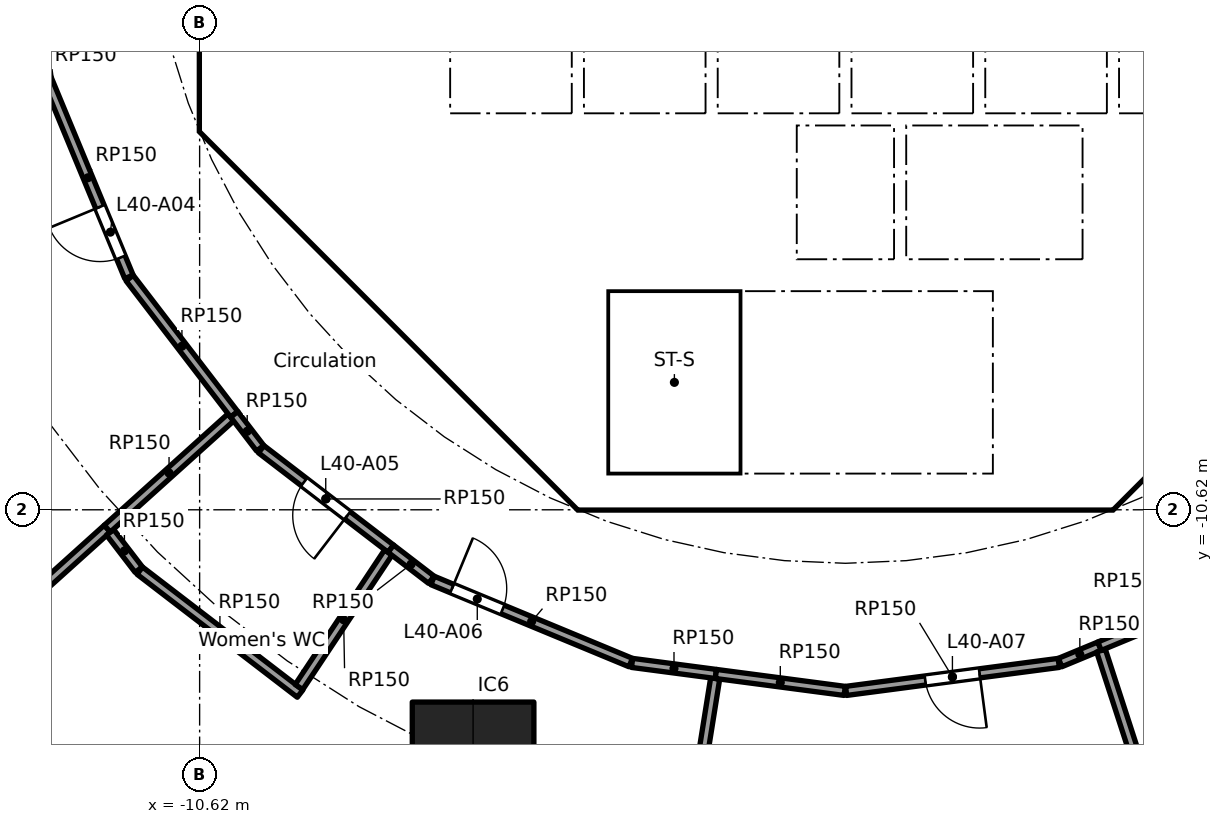
"""IFC4 building model, lengths in metres.
Left out: names, types, materials, properties, quantities, classifications, styles, units other than length and angle.
Written with IfcOpenShell. Run it as: python <this file> out.ifc"""

import sys

from ifc_helpers import new_model, si_unit, direction, frame, frame_2d, origin, origin_2d, place, context, subcontext, project, spatial, polyline, rectangle, outline, extrude, element, fill, save


model = new_model("IFC4")
c1 = context("Model", 3, precision=1e-05, world=origin(), true_north=direction((0.0, 1.0)))
c2 = subcontext(c1, "Body", "Model", "MODEL_VIEW")
j1 = project(units=[si_unit("LENGTHUNIT", "METRE"), si_unit("PLANEANGLEUNIT", "RADIAN")], contexts=[c1])
p1 = place(None, origin())
s1 = spatial("IfcSite", under=j1, at=p1, CompositionType="ELEMENT")
p2 = place(p1, origin())
s2 = spatial("IfcBuilding", under=s1, at=p2, CompositionType="ELEMENT")
p3 = place(p2, frame((0.0, 0.0, 160.3)))
s3 = spatial("IfcBuildingStorey", under=s2, at=p3, CompositionType="ELEMENT", Elevation=160.3)
p4 = place(p3, frame((-6.123, -14.782, 0.0), z_axis=(0.0, 0.0, 1.0), x_axis=(1.0, 0.0, 0.0)))
e1 = element("IfcColumn", 1, at=p4, inside=s3, PredefinedType="COLUMN", context=c2, shape_type="SweptSolid", body=[
    extrude(rectangle(XDim=2.0, YDim=2.0, at=origin_2d()), origin(), (0.0, 0.0, 1.0), 5.6),
])
p5 = place(p3, frame((-10.325, 3.801, 0.0), z_axis=(0.0, 0.0, 1.0), x_axis=(0.0, -1.0, 0.0)))
e2 = element("IfcWall", 2, at=p5, inside=s3, PredefinedType="SHEAR", context=c2, shape_type="SweptSolid", body=[
    extrude(rectangle(XDim=7.602, YDim=0.6, at=frame_2d((3.801, 0.0))), origin(), (0.0, 0.0, 1.0), 5.34),
])
p6 = place(p5, frame((0.651, 0.0, 0.0)))
e3 = element("IfcOpeningElement", 3, at=p6, cuts=e2, PredefinedType="OPENING", context=c2, shape_type="SweptSolid", body=[
    extrude(rectangle(XDim=1.5, YDim=2.1, at=frame_2d((0.75, 1.05))), frame((0.0, 0.31, 0.0), z_axis=(0.0, -1.0, 0.0), x_axis=(1.0, 0.0, 0.0)), (0.0, 0.0, 1.0), 0.62),
])
p7 = place(p5, frame((5.451, 0.0, 0.0)))
e4 = element("IfcOpeningElement", 4, at=p7, cuts=e2, PredefinedType="OPENING", context=c2, shape_type="SweptSolid", body=[
    extrude(rectangle(XDim=1.5, YDim=2.1, at=frame_2d((0.75, 1.05))), frame((0.0, 0.31, 0.0), z_axis=(0.0, -1.0, 0.0), x_axis=(1.0, 0.0, 0.0)), (0.0, 0.0, 1.0), 0.62),
])
p8 = place(p3, frame((-9.988, -4.613, 0.0), z_axis=(0.0, 0.0, 1.0), x_axis=(0.707106781187, -0.707106781187, 0.0)))
e5 = element("IfcWall", 5, at=p8, inside=s3, PredefinedType="SHEAR", context=c2, shape_type="SweptSolid", body=[
    extrude(rectangle(XDim=7.602, YDim=0.6, at=frame_2d((3.801, 0.0))), origin(), (0.0, 0.0, 1.0), 5.34),
])
p9 = place(p8, frame((6.151, 0.0, 0.0)))
e6 = element("IfcOpeningElement", 6, at=p9, cuts=e5, PredefinedType="OPENING", context=c2, shape_type="SweptSolid", body=[
    extrude(rectangle(XDim=1.1, YDim=2.1, at=frame_2d((0.55, 1.05))), frame((0.0, 0.31, 0.0), z_axis=(0.0, -1.0, 0.0), x_axis=(1.0, 0.0, 0.0)), (0.0, 0.0, 1.0), 0.62),
])
p10 = place(p3, frame((4.613, -9.988, 0.0), z_axis=(0.0, 0.0, 1.0), x_axis=(0.707106781187, 0.707106781187, 0.0)))
e7 = element("IfcWall", 7, at=p10, inside=s3, PredefinedType="SHEAR", context=c2, shape_type="SweptSolid", body=[
    extrude(rectangle(XDim=7.602, YDim=0.6, at=frame_2d((3.801, 0.0))), origin(), (0.0, 0.0, 1.0), 5.34),
])
p11 = place(p10, frame((3.201, 0.0, 0.0)))
e8 = element("IfcOpeningElement", 8, at=p11, cuts=e7, PredefinedType="OPENING", context=c2, shape_type="SweptSolid", body=[
    extrude(rectangle(XDim=1.2, YDim=2.1, at=frame_2d((0.6, 1.05))), frame((0.0, 0.31, 0.0), z_axis=(0.0, -1.0, 0.0), x_axis=(1.0, 0.0, 0.0)), (0.0, 0.0, 1.0), 0.62),
])
p12 = place(p3, frame((4.0, -10.025, 0.0), z_axis=(0.0, 0.0, 1.0), x_axis=(0.0, 1.0, 0.0)))
e9 = element("IfcWall", 9, at=p12, inside=s3, PredefinedType="SOLIDWALL", context=c2, shape_type="SweptSolid", body=[
    extrude(rectangle(XDim=3.0, YDim=0.2, at=frame_2d((1.5, 0.0))), origin(), (0.0, 0.0, 1.0), 5.34),
])
p13 = place(p12, frame((0.975, 0.0, 0.0)))
e10 = element("IfcOpeningElement", 10, at=p13, cuts=e9, PredefinedType="OPENING", context=c2, shape_type="SweptSolid", body=[
    extrude(rectangle(XDim=1.1, YDim=2.1, at=frame_2d((0.55, 1.05))), frame((0.0, 0.11, 0.0), z_axis=(0.0, -1.0, 0.0), x_axis=(1.0, 0.0, 0.0)), (0.0, 0.0, 1.0), 0.22),
])
p14 = place(p3, frame((-5.8, -8.227, 0.0), z_axis=(0.0, 0.0, 1.0), x_axis=(0.0, 1.0, 0.0)))
e11 = element("IfcWall", 11, at=p14, inside=s3, PredefinedType="PARTITIONING", context=c2, shape_type="SweptSolid", body=[
    extrude(rectangle(XDim=3.927, YDim=0.15, at=frame_2d((1.963, 0.0))), origin(), (0.0, 0.0, 1.0), 5.34),
])
p15 = place(p14, frame((2.764, 0.0, 0.0)))
e12 = element("IfcOpeningElement", 12, at=p15, cuts=e11, PredefinedType="OPENING", context=c2, shape_type="SweptSolid", body=[
    extrude(rectangle(XDim=0.9, YDim=2.1, at=frame_2d((0.45, 1.05))), frame((0.0, 0.085, 0.0), z_axis=(0.0, -1.0, 0.0), x_axis=(1.0, 0.0, 0.0)), (0.0, 0.0, 1.0), 0.17),
])
p16 = place(p14, frame((0.688, 0.0, 0.0)))
e13 = element("IfcOpeningElement", 13, at=p16, cuts=e11, PredefinedType="OPENING", context=c2, shape_type="SweptSolid", body=[
    extrude(rectangle(XDim=0.9, YDim=2.1, at=frame_2d((0.45, 1.05))), frame((0.0, 0.085, 0.0), z_axis=(0.0, -1.0, 0.0), x_axis=(1.0, 0.0, 0.0)), (0.0, 0.0, 1.0), 0.17),
])
p17 = place(p3, frame((4.0, -6.5, 0.0), z_axis=(0.0, 0.0, 1.0), x_axis=(0.0, 1.0, 0.0)))
e14 = element("IfcWall", 14, at=p17, inside=s3, PredefinedType="SOLIDWALL", context=c2, shape_type="SweptSolid", body=[
    extrude(rectangle(XDim=2.2, YDim=0.2, at=frame_2d((1.1, 0.0))), origin(), (0.0, 0.0, 1.0), 5.34),
])
p18 = place(p17, frame((0.55, 0.0, 0.0)))
e15 = element("IfcOpeningElement", 15, at=p18, cuts=e14, PredefinedType="OPENING", context=c2, shape_type="SweptSolid", body=[
    extrude(rectangle(XDim=1.1, YDim=2.1, at=frame_2d((0.55, 1.05))), frame((0.0, 0.11, 0.0), z_axis=(0.0, -1.0, 0.0), x_axis=(1.0, 0.0, 0.0)), (0.0, 0.0, 1.0), 0.22),
])
p19 = place(p3, frame((-4.0, -6.5, 0.0), z_axis=(0.0, 0.0, 1.0), x_axis=(0.0, 1.0, 0.0)))
e16 = element("IfcWall", 16, at=p19, inside=s3, PredefinedType="SOLIDWALL", context=c2, shape_type="SweptSolid", body=[
    extrude(rectangle(XDim=2.2, YDim=0.2, at=frame_2d((1.1, 0.0))), origin(), (0.0, 0.0, 1.0), 5.34),
])
p20 = place(p19, frame((0.65, 0.0, 0.0)))
e17 = element("IfcOpeningElement", 17, at=p20, cuts=e16, PredefinedType="OPENING", context=c2, shape_type="SweptSolid", body=[
    extrude(rectangle(XDim=0.9, YDim=2.1, at=frame_2d((0.45, 1.05))), frame((0.0, 0.11, 0.0), z_axis=(0.0, -1.0, 0.0), x_axis=(1.0, 0.0, 0.0)), (0.0, 0.0, 1.0), 0.22),
])
p21 = place(p3, origin())
e18 = element("IfcWall", 18, at=p21, inside=s3, PredefinedType="SHEAR", context=c2, shape_type="SweptSolid", body=[
    extrude(outline(polyline([(-10.625, -3.801), (-10.025, -3.801), (-10.025, -4.152), (-9.776, -4.401), (-10.2, -4.825), (-10.625, -4.401), (-10.625, -3.801)])), origin(), (0.0, 0.0, 1.0), 5.34),
])
p22 = place(p3, origin())
e19 = element("IfcWall", 19, at=p22, inside=s3, PredefinedType="SHEAR", context=c2, shape_type="SweptSolid", body=[
    extrude(outline(polyline([(-4.152, -10.025), (4.152, -10.025), (4.401, -9.776), (4.825, -10.2), (4.401, -10.625), (-4.401, -10.625), (-4.825, -10.2), (-4.401, -9.776), (-4.152, -10.025)])), origin(), (0.0, 0.0, 1.0), 5.34),
])
for number, where, z_axis, x_axis in (
    (20, (-0.9, -6.5, 0.0), (0.0, 0.0, 1.0), (0.0, 1.0, 0.0)),
    (21, (0.9, -6.5, 0.0), (0.0, 0.0, 1.0), (0.0, 1.0, 0.0)),
):
    element("IfcWall", number, at=place(p3, frame(where, z_axis=z_axis, x_axis=x_axis)), inside=s3, PredefinedType="SOLIDWALL", context=c2, shape_type="SweptSolid", body=[
        extrude(rectangle(XDim=2.2, YDim=0.2, at=frame_2d((1.1, 0.0))), origin(), (0.0, 0.0, 1.0), 5.34),
    ])
p23 = place(p3, origin())
e22 = element("IfcWall", 22, at=p23, inside=s3, PredefinedType="SOLIDWALL", context=c2, shape_type="SweptSolid", body=[
    extrude(outline(polyline([(-6.7, -2.1), (-6.5, -2.1), (-6.5, -4.1), (-4.5, -4.1), (-4.5, -2.1), (-4.3, -2.1), (-4.3, -4.1), (-2.3, -4.1), (-2.3, -2.1), (-2.1, -2.1), (-2.1, -4.1), (-0.1, -4.1), (-0.1, -2.1), (0.1, -2.1), (0.1, -4.1), (2.1, -4.1), (2.1, -2.1), (2.3, -2.1), (2.3, -4.1), (4.3, -4.1), (4.3, -2.1), (4.5, -2.1), (4.5, -4.1), (6.5, -4.1), (6.5, -2.1), (6.7, -2.1), (6.7, -4.3), (-6.7, -4.3), (-6.7, -2.1)])), origin(), (0.0, 0.0, 1.0), 5.34),
])
p24 = place(p3, frame((-10.025, -4.0, 0.0), z_axis=(0.0, 0.0, 1.0), x_axis=(1.0, 0.0, 0.0)))
e23 = element("IfcWall", 23, at=p24, inside=s3, PredefinedType="PARTITIONING", context=c2, shape_type="SweptSolid", body=[
    extrude(rectangle(XDim=3.325, YDim=0.2, at=frame_2d((1.662, 0.0))), origin(), (0.0, 0.0, 1.0), 5.34),
])
p25 = place(p3, frame((-8.301, -5.8, 0.0), z_axis=(0.0, 0.0, 1.0), x_axis=(1.0, 0.0, 0.0)))
e24 = element("IfcWall", 24, at=p25, inside=s3, PredefinedType="PARTITIONING", context=c2, shape_type="SweptSolid", body=[
    extrude(rectangle(XDim=2.426, YDim=0.15, at=frame_2d((1.213, 0.0))), origin(), (0.0, 0.0, 1.0), 5.34),
])
p26 = place(p3, origin())
e25 = element("IfcWall", 25, at=p26, inside=s3, PredefinedType="SOLIDWALL", context=c2, shape_type="SweptSolid", body=[
    extrude(outline(polyline([(-3.9, -10.025), (-4.1, -10.025), (-4.1, -7.025), (-3.9, -7.025), (-3.9, -10.025)])), origin(), (0.0, 0.0, 1.0), 5.34),
])
p27 = place(p3, origin())
e26 = element("IfcWall", 26, at=p27, inside=s3, PredefinedType="SOLIDWALL", context=c2, shape_type="SweptSolid", body=[
    extrude(outline(polyline([(4.1, -7.025), (-4.1, -7.025), (-4.1, -6.5), (4.1, -6.5), (4.1, -7.025)])), origin(), (0.0, 0.0, 1.0), 5.34),
])
p28 = place(p3, frame((-12.138, -10.93, 0.0), z_axis=(0.0, 0.0, 1.0), x_axis=(-0.743151323341, -0.66912338968, 0.0)))
e27 = element("IfcWall", 27, at=p28, inside=s3, PredefinedType="PARTITIONING", context=c2, shape_type="SweptSolid", body=[
    extrude(rectangle(XDim=14.791, YDim=0.15, at=frame_2d((7.396, 0.0))), origin(), (0.0, 0.0, 1.0), 5.34),
])
p29 = place(p3, frame((-11.782, -6.789, 0.0), z_axis=(0.0, 0.0, 1.0), x_axis=(-0.382677866108, 0.923881838111, 0.0)))
e28 = element("IfcWall", 28, at=p29, inside=s3, PredefinedType="PARTITIONING", context=c2, shape_type="SweptSolid", body=[
    extrude(rectangle(XDim=3.527, YDim=0.15, at=frame_2d((1.763, 0.0))), origin(), (0.0, 0.0, 1.0), 5.34),
])
p30 = place(p29, frame((0.346, 0.0, 0.0)))
e29 = element("IfcOpeningElement", 29, at=p30, cuts=e28, PredefinedType="OPENING", context=c2, shape_type="SweptSolid", body=[
    extrude(rectangle(XDim=0.9, YDim=2.1, at=frame_2d((0.45, 1.05))), frame((0.0, 0.085, 0.0), z_axis=(0.0, -1.0, 0.0), x_axis=(1.0, 0.0, 0.0)), (0.0, 0.0, 1.0), 0.17),
])
p31 = place(p3, frame((-11.621, -11.604, 0.0), z_axis=(0.0, 0.0, 1.0), x_axis=(-0.608781909099, 0.793337624945, 0.0)))
e30 = element("IfcWall", 30, at=p31, inside=s3, PredefinedType="PARTITIONING", context=c2, shape_type="SweptSolid", body=[
    extrude(rectangle(XDim=0.775, YDim=0.15, at=frame_2d((0.388, 0.0))), origin(), (0.0, 0.0, 1.0), 5.34),
])
p32 = place(p3, frame((-10.107, -9.101, 0.0), z_axis=(0.0, 0.0, 1.0), x_axis=(-0.743116473198, -0.669162093414, 0.0)))
e31 = element("IfcWall", 31, at=p32, inside=s3, PredefinedType="PARTITIONING", context=c2, shape_type="SweptSolid", body=[
    extrude(rectangle(XDim=2.733, YDim=0.15, at=frame_2d((1.367, 0.0))), origin(), (0.0, 0.0, 1.0), 5.34),
])
p33 = place(p3, frame((-10.051, -9.05, 0.0), z_axis=(0.0, 0.0, 1.0), x_axis=(-0.608745411834, 0.793365630445, 0.0)))
e32 = element("IfcWall", 32, at=p33, inside=s3, PredefinedType="PARTITIONING", context=c2, shape_type="SweptSolid", body=[
    extrude(rectangle(XDim=2.825, YDim=0.15, at=frame_2d((1.412, 0.0))), origin(), (0.0, 0.0, 1.0), 5.34),
])
p34 = place(p3, frame((-9.624, -9.607, 0.0), z_axis=(0.0, 0.0, 1.0), x_axis=(-0.608701690893, 0.793399175387, 0.0)))
e33 = element("IfcWall", 33, at=p34, inside=s3, PredefinedType="PARTITIONING", context=c2, shape_type="SweptSolid", body=[
    extrude(rectangle(XDim=0.702, YDim=0.15, at=frame_2d((0.351, 0.0))), origin(), (0.0, 0.0, 1.0), 5.34),
])
p35 = place(p3, frame((-8.968, -13.644, 0.0), z_axis=(0.0, 0.0, 1.0), x_axis=(-0.79334728927, 0.608769314772, 0.0)))
e34 = element("IfcWall", 34, at=p35, inside=s3, PredefinedType="PARTITIONING", context=c2, shape_type="SweptSolid", body=[
    extrude(rectangle(XDim=3.323, YDim=0.15, at=frame_2d((1.661, 0.0))), origin(), (0.0, 0.0, 1.0), 5.34),
])
p36 = place(p3, frame((-7.476, -11.26, 0.0), z_axis=(0.0, 0.0, 1.0), x_axis=(-0.793376684251, 0.60873100536, 0.0)))
e35 = element("IfcWall", 35, at=p36, inside=s3, PredefinedType="PARTITIONING", context=c2, shape_type="SweptSolid", body=[
    extrude(rectangle(XDim=2.687, YDim=0.15, at=frame_2d((1.343, 0.0))), origin(), (0.0, 0.0, 1.0), 5.34),
])
p37 = place(p36, frame((0.899, 0.0, 0.0)))
e36 = element("IfcOpeningElement", 36, at=p37, cuts=e35, PredefinedType="OPENING", context=c2, shape_type="SweptSolid", body=[
    extrude(rectangle(XDim=0.9, YDim=2.1, at=frame_2d((0.45, 1.05))), frame((0.0, 0.085, 0.0), z_axis=(0.0, -1.0, 0.0), x_axis=(1.0, 0.0, 0.0)), (0.0, 0.0, 1.0), 0.17),
])
p38 = place(p3, frame((-7.517, -11.322, 0.0), z_axis=(0.0, 0.0, 1.0), x_axis=(-0.553129626005, -0.833095202744, 0.0)))
e37 = element("IfcWall", 37, at=p38, inside=s3, PredefinedType="PARTITIONING", context=c2, shape_type="SweptSolid", body=[
    extrude(rectangle(XDim=2.656, YDim=0.15, at=frame_2d((1.328, 0.0))), origin(), (0.0, 0.0, 1.0), 5.34),
])
p39 = place(p3, frame((-6.809, -11.771, 0.0), z_axis=(0.0, 0.0, 1.0), x_axis=(-0.793358303575, 0.608754960677, 0.0)))
e38 = element("IfcWall", 38, at=p39, inside=s3, PredefinedType="PARTITIONING", context=c2, shape_type="SweptSolid", body=[
    extrude(rectangle(XDim=0.84, YDim=0.15, at=frame_2d((0.42, 0.0))), origin(), (0.0, 0.0, 1.0), 5.34),
])
p40 = place(p3, frame((-3.531, -13.132, 0.0), z_axis=(0.0, 0.0, 1.0), x_axis=(-0.923881838111, 0.382677866108, 0.0)))
e39 = element("IfcWall", 39, at=p40, inside=s3, PredefinedType="PARTITIONING", context=c2, shape_type="SweptSolid", body=[
    extrude(rectangle(XDim=3.527, YDim=0.15, at=frame_2d((1.763, 0.0))), origin(), (0.0, 0.0, 1.0), 5.34),
])
p41 = place(p40, frame((2.281, 0.0, 0.0)))
e40 = element("IfcOpeningElement", 40, at=p41, cuts=e39, PredefinedType="OPENING", context=c2, shape_type="SweptSolid", body=[
    extrude(rectangle(XDim=0.9, YDim=2.1, at=frame_2d((0.45, 1.05))), frame((0.0, 0.085, 0.0), z_axis=(0.0, -1.0, 0.0), x_axis=(1.0, 0.0, 0.0)), (0.0, 0.0, 1.0), 0.17),
])
p42 = place(p3, frame((-2.142, -13.394, 0.0), z_axis=(0.0, 0.0, 1.0), x_axis=(-0.157896749687, -0.987455627579, 0.0)))
e41 = element("IfcWall", 41, at=p42, inside=s3, PredefinedType="PARTITIONING", context=c2, shape_type="SweptSolid", body=[
    extrude(rectangle(XDim=19.805, YDim=0.15, at=frame_2d((9.903, 0.0))), origin(), (0.0, 0.0, 1.0), 5.34),
])
p43 = place(p3, frame((-2.13, -13.32, 0.0), z_axis=(0.0, 0.0, 1.0), x_axis=(-0.991448914516, 0.130495401857, 0.0)))
e42 = element("IfcWall", 42, at=p43, inside=s3, PredefinedType="PARTITIONING", context=c2, shape_type="SweptSolid", body=[
    extrude(rectangle(XDim=1.39, YDim=0.15, at=frame_2d((0.695, 0.0))), origin(), (0.0, 0.0, 1.0), 5.34),
])
p44 = place(p3, frame((-0.012, -13.598, 0.0), z_axis=(0.0, 0.0, 1.0), x_axis=(-0.991448071145, 0.130501809272, 0.0)))
e43 = element("IfcWall", 43, at=p44, inside=s3, PredefinedType="PARTITIONING", context=c2, shape_type="SweptSolid", body=[
    extrude(rectangle(XDim=2.136, YDim=0.15, at=frame_2d((1.068, 0.0))), origin(), (0.0, 0.0, 1.0), 5.34),
])
p45 = place(p3, frame((3.508, -13.138, 0.0), z_axis=(0.0, 0.0, 1.0), x_axis=(-0.991448403586, -0.130499283623, 0.0)))
e44 = element("IfcWall", 44, at=p45, inside=s3, PredefinedType="PARTITIONING", context=c2, shape_type="SweptSolid", body=[
    extrude(rectangle(XDim=3.527, YDim=0.15, at=frame_2d((1.763, 0.0))), origin(), (0.0, 0.0, 1.0), 5.34),
])
p46 = place(p45, frame((1.313, 0.0, 0.0)))
e45 = element("IfcOpeningElement", 45, at=p46, cuts=e44, PredefinedType="OPENING", context=c2, shape_type="SweptSolid", body=[
    extrude(rectangle(XDim=0.9, YDim=2.1, at=frame_2d((0.45, 1.05))), frame((0.0, 0.085, 0.0), z_axis=(0.0, -1.0, 0.0), x_axis=(1.0, 0.0, 0.0)), (0.0, 0.0, 1.0), 0.17),
])
p47 = place(p3, frame((4.18, -12.863, 0.0), z_axis=(0.0, 0.0, 1.0), x_axis=(-0.923877031545, -0.382689470177, 0.0)))
e46 = element("IfcWall", 46, at=p47, inside=s3, PredefinedType="PARTITIONING", context=c2, shape_type="SweptSolid", body=[
    extrude(rectangle(XDim=0.702, YDim=0.15, at=frame_2d((0.351, 0.0))), origin(), (0.0, 0.0, 1.0), 5.34),
])
p48 = place(p3, frame((4.203, -12.935, 0.0), z_axis=(0.0, 0.0, 1.0), x_axis=(0.309019390558, -0.951055737725, 0.0)))
e47 = element("IfcWall", 47, at=p48, inside=s3, PredefinedType="PARTITIONING", context=c2, shape_type="SweptSolid", body=[
    extrude(rectangle(XDim=18.048, YDim=0.15, at=frame_2d((9.024, 0.0))), origin(), (0.0, 0.0, 1.0), 5.34),
])
p49 = place(p3, frame((6.789, -11.782, 0.0), z_axis=(0.0, 0.0, 1.0), x_axis=(-0.923883033442, -0.382674980262, 0.0)))
e48 = element("IfcWall", 48, at=p49, inside=s3, PredefinedType="PARTITIONING", context=c2, shape_type="SweptSolid", body=[
    extrude(rectangle(XDim=2.824, YDim=0.15, at=frame_2d((1.412, 0.0))), origin(), (0.0, 0.0, 1.0), 5.34),
])
p50 = place(p49, frame((0.454, 0.0, 0.0)))
e49 = element("IfcOpeningElement", 49, at=p50, cuts=e48, PredefinedType="OPENING", context=c2, shape_type="SweptSolid", body=[
    extrude(rectangle(XDim=0.9, YDim=2.1, at=frame_2d((0.45, 1.05))), frame((0.0, 0.085, 0.0), z_axis=(0.0, -1.0, 0.0), x_axis=(1.0, 0.0, 0.0)), (0.0, 0.0, 1.0), 0.17),
])
p51 = place(p18, origin())
e50 = element("IfcDoor", 50, at=p51, inside=s3, OperationType="DOUBLE_DOOR_SLIDING", PredefinedType="DOOR", context=c2, shape_type="SweptSolid", body=[
    extrude(rectangle(XDim=1.1, YDim=2.1, at=frame_2d((0.55, 1.05))), frame((0.0, 0.025, 0.0), z_axis=(0.0, -1.0, 0.0), x_axis=(1.0, 0.0, 0.0)), (0.0, 0.0, 1.0), 0.05),
])
fill(e15, e50)
p52 = place(p13, origin())
e51 = element("IfcDoor", 51, at=p52, inside=s3, OperationType="SINGLE_SWING_LEFT", PredefinedType="DOOR", context=c2, shape_type="SweptSolid", body=[
    extrude(rectangle(XDim=1.1, YDim=2.1, at=frame_2d((0.55, 1.05))), frame((0.0, 0.025, 0.0), z_axis=(0.0, -1.0, 0.0), x_axis=(1.0, 0.0, 0.0)), (0.0, 0.0, 1.0), 0.05),
])
fill(e10, e51)
p53 = place(p15, origin())
e52 = element("IfcDoor", 52, at=p53, inside=s3, OperationType="SINGLE_SWING_LEFT", PredefinedType="DOOR", context=c2, shape_type="SweptSolid", body=[
    extrude(rectangle(XDim=0.9, YDim=2.1, at=frame_2d((0.45, 1.05))), frame((0.0, 0.025, 0.0), z_axis=(0.0, -1.0, 0.0), x_axis=(1.0, 0.0, 0.0)), (0.0, 0.0, 1.0), 0.05),
])
fill(e12, e52)
p54 = place(p16, origin())
e53 = element("IfcDoor", 53, at=p54, inside=s3, OperationType="SINGLE_SWING_LEFT", PredefinedType="DOOR", context=c2, shape_type="SweptSolid", body=[
    extrude(rectangle(XDim=0.9, YDim=2.1, at=frame_2d((0.45, 1.05))), frame((0.0, 0.025, 0.0), z_axis=(0.0, -1.0, 0.0), x_axis=(1.0, 0.0, 0.0)), (0.0, 0.0, 1.0), 0.05),
])
fill(e13, e53)
p55 = place(p20, frame((0.9, 0.0, 0.0), x_axis=(-1.0, 0.0, 0.0)))
e54 = element("IfcDoor", 54, at=p55, inside=s3, OperationType="SINGLE_SWING_RIGHT", PredefinedType="DOOR", context=c2, shape_type="SweptSolid", body=[
    extrude(rectangle(XDim=0.9, YDim=2.1, at=frame_2d((0.45, 1.05))), frame((0.0, 0.025, 0.0), z_axis=(0.0, -1.0, 0.0), x_axis=(1.0, 0.0, 0.0)), (0.0, 0.0, 1.0), 0.05),
])
fill(e17, e54)
p56 = place(p7, origin())
e55 = element("IfcDoor", 55, at=p56, inside=s3, OperationType="DOUBLE_DOOR_SINGLE_SWING", PredefinedType="DOOR", context=c2, shape_type="SweptSolid", body=[
    extrude(rectangle(XDim=1.5, YDim=2.1, at=frame_2d((0.75, 1.05))), frame((0.0, 0.025, 0.0), z_axis=(0.0, -1.0, 0.0), x_axis=(1.0, 0.0, 0.0)), (0.0, 0.0, 1.0), 0.05),
])
fill(e4, e55)
p57 = place(p9, origin())
e56 = element("IfcDoor", 56, at=p57, inside=s3, OperationType="SINGLE_SWING_LEFT", PredefinedType="DOOR", context=c2, shape_type="SweptSolid", body=[
    extrude(rectangle(XDim=1.1, YDim=2.1, at=frame_2d((0.55, 1.05))), frame((0.0, 0.025, 0.0), z_axis=(0.0, -1.0, 0.0), x_axis=(1.0, 0.0, 0.0)), (0.0, 0.0, 1.0), 0.05),
])
fill(e6, e56)
p58 = place(p30, origin())
e57 = element("IfcDoor", 57, at=p58, inside=s3, OperationType="SINGLE_SWING_RIGHT", PredefinedType="DOOR", context=c2, shape_type="SweptSolid", body=[
    extrude(rectangle(XDim=0.9, YDim=2.1, at=frame_2d((0.45, 1.05))), frame((0.0, 0.025, 0.0), z_axis=(0.0, -1.0, 0.0), x_axis=(1.0, 0.0, 0.0)), (0.0, 0.0, 1.0), 0.05),
])
fill(e29, e57)
p59 = place(p37, origin())
e58 = element("IfcDoor", 58, at=p59, inside=s3, OperationType="SINGLE_SWING_LEFT", PredefinedType="DOOR", context=c2, shape_type="SweptSolid", body=[
    extrude(rectangle(XDim=0.9, YDim=2.1, at=frame_2d((0.45, 1.05))), frame((0.0, 0.025, 0.0), z_axis=(0.0, -1.0, 0.0), x_axis=(1.0, 0.0, 0.0)), (0.0, 0.0, 1.0), 0.05),
])
fill(e36, e58)
p60 = place(p41, frame((0.9, 0.0, 0.0), x_axis=(-1.0, 0.0, 0.0)))
e59 = element("IfcDoor", 59, at=p60, inside=s3, OperationType="SINGLE_SWING_LEFT", PredefinedType="DOOR", context=c2, shape_type="SweptSolid", body=[
    extrude(rectangle(XDim=0.9, YDim=2.1, at=frame_2d((0.45, 1.05))), frame((0.0, 0.025, 0.0), z_axis=(0.0, -1.0, 0.0), x_axis=(1.0, 0.0, 0.0)), (0.0, 0.0, 1.0), 0.05),
])
fill(e40, e59)
p61 = place(p46, origin())
e60 = element("IfcDoor", 60, at=p61, inside=s3, OperationType="SINGLE_SWING_LEFT", PredefinedType="DOOR", context=c2, shape_type="SweptSolid", body=[
    extrude(rectangle(XDim=0.9, YDim=2.1, at=frame_2d((0.45, 1.05))), frame((0.0, 0.025, 0.0), z_axis=(0.0, -1.0, 0.0), x_axis=(1.0, 0.0, 0.0)), (0.0, 0.0, 1.0), 0.05),
])
fill(e45, e60)
save(model, sys.argv[1])
